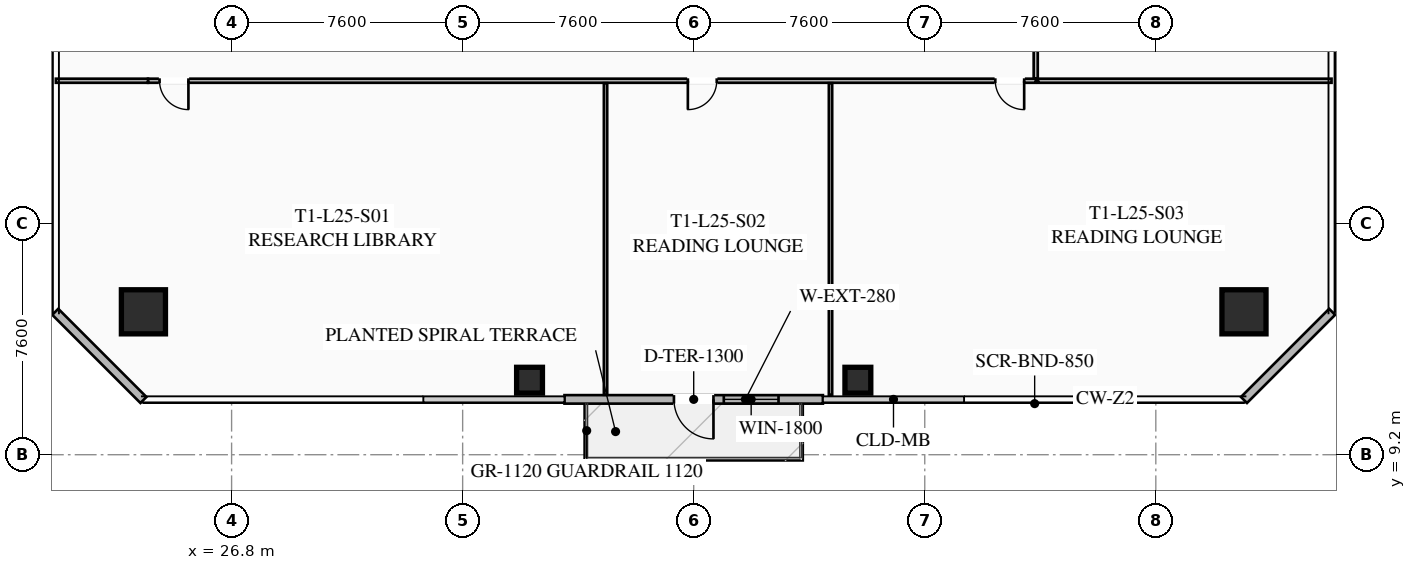
"""IFC4 building model, lengths in metres.
Left out: names, types, materials, properties, quantities, classifications, styles, units other than length and angle.
Written with IfcOpenShell. Run it as: python <this file> out.ifc"""

import sys

from ifc_helpers import new_model, si_unit, direction, frame, frame_2d, origin, origin_2d, place, context, subcontext, project, spatial, rectangle, hollow_rectangle, extrude, element, fill, save


model = new_model("IFC4")
c1 = context("Model", 3, precision=1e-05, world=origin(), true_north=direction((0.0, 1.0)))
c2 = subcontext(c1, "Body", "Model", "MODEL_VIEW")
j1 = project(units=[si_unit("LENGTHUNIT", "METRE"), si_unit("PLANEANGLEUNIT", "RADIAN")], contexts=[c1])
p1 = place(None, origin())
s1 = spatial("IfcSite", under=j1, at=p1, CompositionType="ELEMENT")
p2 = place(p1, origin())
s2 = spatial("IfcBuilding", under=s1, at=p2, CompositionType="ELEMENT")
p3 = place(p2, frame((0.0, 0.0, 95.6)))
s3 = spatial("IfcBuildingStorey", under=s2, at=p3, CompositionType="ELEMENT", Elevation=95.6)
for number, where, z_axis, x_axis in (
    (1, (23.9, 13.9, 0.0), (0.0, 0.0, 1.0), (1.0, 0.0, 0.0)),
    (2, (60.1, 13.9, 0.0), (0.0, 0.0, 1.0), (1.0, 0.0, 0.0)),
):
    element("IfcColumn", number, at=place(p3, frame(where, z_axis=z_axis, x_axis=x_axis)), inside=s3, PredefinedType="COLUMN", context=c2, shape_type="SweptSolid", body=[
        extrude(hollow_rectangle(XDim=1.45, YDim=1.45, WallThickness=0.055, at=origin_2d()), origin(), (0.0, 0.0, 1.0), 3.35),
    ])
for number, where, z_axis, x_axis in (
    (3, (36.6, 11.65, 0.0), (0.0, 0.0, 1.0), (1.0, 0.0, 0.0)),
    (4, (47.4, 11.65, 0.0), (0.0, 0.0, 1.0), (1.0, 0.0, 0.0)),
):
    element("IfcColumn", number, at=place(p3, frame(where, z_axis=z_axis, x_axis=x_axis)), inside=s3, PredefinedType="COLUMN", context=c2, shape_type="SweptSolid", body=[
        extrude(hollow_rectangle(XDim=0.85, YDim=0.85, WallThickness=0.035, at=origin_2d()), origin(), (0.0, 0.0, 1.0), 3.35),
    ])
p4 = place(p3, frame((46.25, 11.02, 0.0), z_axis=(0.0, 0.0, 1.0), x_axis=(-1.0, 0.0, 0.0)))
e5 = element("IfcWall", 5, at=p4, inside=s3, PredefinedType="SOLIDWALL", context=c2, shape_type="SweptSolid", body=[
    extrude(rectangle(XDim=8.5, YDim=0.28, at=frame_2d((4.25, 0.0))), origin(), (0.0, 0.0, 1.0), 3.35),
])
p5 = place(p4, frame((3.6, 0.0, 0.0)))
e6 = element("IfcOpeningElement", 6, at=p5, cuts=e5, PredefinedType="OPENING", context=c2, shape_type="SweptSolid", body=[
    extrude(rectangle(XDim=1.3, YDim=2.15, at=frame_2d((0.65, 1.075))), frame((0.0, 0.15, 0.0), z_axis=(0.0, -1.0, 0.0), x_axis=(1.0, 0.0, 0.0)), (0.0, 0.0, 1.0), 0.3),
])
p6 = place(p4, frame((1.46, 0.0, 0.85)))
e7 = element("IfcOpeningElement", 7, at=p6, cuts=e5, PredefinedType="OPENING", context=c2, shape_type="SweptSolid", body=[
    extrude(rectangle(XDim=1.8, YDim=1.92, at=frame_2d((0.9, 0.96))), frame((0.0, 0.15, 0.0), z_axis=(0.0, -1.0, 0.0), x_axis=(1.0, 0.0, 0.0)), (0.0, 0.0, 1.0), 0.3),
])
for number, where, z_axis, x_axis in (
    (8, (23.9, 11.0, 0.0), (0.0, 0.0, 1.0), (-0.707, 0.707, 0.0)),
    (9, (63.0, 13.9, 0.0), (0.0, 0.0, 1.0), (-0.707, -0.707, 0.0)),
):
    element("IfcWall", number, at=place(p3, frame(where, z_axis=z_axis, x_axis=x_axis)), inside=s3, PredefinedType="SOLIDWALL", context=c2, shape_type="SweptSolid", body=[
        extrude(rectangle(XDim=4.101, YDim=0.28, at=frame_2d((2.051, 0.0))), origin(), (0.0, 0.0, 1.0), 3.35),
    ])
p7 = place(p3, frame((53.25, 21.5, 0.0), z_axis=(0.0, 0.0, 1.0), x_axis=(-1.0, 0.0, 0.0)))
e10 = element("IfcWall", 10, at=p7, inside=s3, PredefinedType="PARTITIONING", context=c2, shape_type="SweptSolid", body=[
    extrude(rectangle(XDim=29.2, YDim=0.135, at=frame_2d((14.6, 0.0))), origin(), (0.0, 0.0, 1.0), 2.703),
])
p8 = place(p7, frame((27.87, 0.0, 0.0)))
e11 = element("IfcOpeningElement", 11, at=p8, cuts=e10, PredefinedType="OPENING", context=c2, shape_type="SweptSolid", body=[
    extrude(rectangle(XDim=0.95, YDim=2.05, at=frame_2d((0.475, 1.025))), frame((0.0, 0.077, 0.0), z_axis=(0.0, -1.0, 0.0), x_axis=(1.0, 0.0, 0.0)), (0.0, 0.0, 1.0), 0.155),
])
p9 = place(p7, frame((10.492, 0.0, 0.0)))
e12 = element("IfcOpeningElement", 12, at=p9, cuts=e10, PredefinedType="OPENING", context=c2, shape_type="SweptSolid", body=[
    extrude(rectangle(XDim=0.95, YDim=2.05, at=frame_2d((0.475, 1.025))), frame((0.0, 0.077, 0.0), z_axis=(0.0, -1.0, 0.0), x_axis=(1.0, 0.0, 0.0)), (0.0, 0.0, 1.0), 0.155),
])
p10 = place(p7, frame((0.38, 0.0, 0.0)))
e13 = element("IfcOpeningElement", 13, at=p10, cuts=e10, PredefinedType="OPENING", context=c2, shape_type="SweptSolid", body=[
    extrude(rectangle(XDim=0.95, YDim=2.05, at=frame_2d((0.475, 1.025))), frame((0.0, 0.077, 0.0), z_axis=(0.0, -1.0, 0.0), x_axis=(1.0, 0.0, 0.0)), (0.0, 0.0, 1.0), 0.155),
])
p11 = place(p3, frame((21.02, 21.5, 0.0), z_axis=(0.0, 0.0, 1.0), x_axis=(1.0, 0.0, 0.0)))
e14 = element("IfcWall", 14, at=p11, inside=s3, PredefinedType="PARTITIONING", context=c2, shape_type="SweptSolid", body=[
    extrude(rectangle(XDim=3.03, YDim=0.135, at=frame_2d((1.515, 0.0))), origin(), (0.0, 0.0, 1.0), 2.703),
])
for number, where, z_axis, x_axis in (
    (15, (39.1, 11.17, 0.0), (0.0, 0.0, 1.0), (0.0, 1.0, 0.0)),
    (16, (46.5, 11.17, 0.0), (0.0, 0.0, 1.0), (0.0, 1.0, 0.0)),
):
    element("IfcWall", number, at=place(p3, frame(where, z_axis=z_axis, x_axis=x_axis)), inside=s3, PredefinedType="PARTITIONING", context=c2, shape_type="SweptSolid", body=[
        extrude(rectangle(XDim=10.25, YDim=0.11, at=frame_2d((5.125, 0.0))), origin(), (0.0, 0.0, 1.0), 2.703),
    ])
p12 = place(p3, frame((53.25, 41.69, 0.0), z_axis=(0.0, 0.0, 1.0), x_axis=(0.0, -1.0, 0.0)))
e17 = element("IfcWall", 17, at=p12, inside=s3, PredefinedType="PARTITIONING", context=c2, shape_type="SweptSolid", body=[
    extrude(rectangle(XDim=20.11, YDim=0.135, at=frame_2d((10.055, 0.0))), origin(), (0.0, 0.0, 1.0), 2.703),
])
p13 = place(p12, frame((9.078, 0.0, 0.0)))
e18 = element("IfcOpeningElement", 18, at=p13, cuts=e17, PredefinedType="OPENING", context=c2, shape_type="SweptSolid", body=[
    extrude(rectangle(XDim=0.95, YDim=2.05, at=frame_2d((0.475, 1.025))), frame((0.0, 0.077, 0.0), z_axis=(0.0, -1.0, 0.0), x_axis=(1.0, 0.0, 0.0)), (0.0, 0.0, 1.0), 0.155),
])
p14 = place(p3, frame((53.33, 21.5, 0.0), z_axis=(0.0, 0.0, 1.0), x_axis=(1.0, 0.0, 0.0)))
e19 = element("IfcWall", 19, at=p14, inside=s3, PredefinedType="PARTITIONING", context=c2, shape_type="SweptSolid", body=[
    extrude(rectangle(XDim=9.65, YDim=0.135, at=frame_2d((4.825, 0.0))), origin(), (0.0, 0.0, 1.0), 2.703),
])
p15 = place(p5, origin())
e20 = element("IfcDoor", 20, at=p15, inside=s3, OperationType="SINGLE_SWING_LEFT", PredefinedType="DOOR", context=c2, shape_type="SweptSolid", body=[
    extrude(rectangle(XDim=1.3, YDim=2.15, at=frame_2d((0.65, 1.075))), frame((0.0, 0.025, 0.0), z_axis=(0.0, -1.0, 0.0), x_axis=(1.0, 0.0, 0.0)), (0.0, 0.0, 1.0), 0.05),
])
fill(e6, e20)
p16 = place(p6, origin())
e21 = element("IfcWindow", 21, at=p16, inside=s3, PartitioningType="SINGLE_PANEL", PredefinedType="WINDOW", context=c2, shape_type="SweptSolid", body=[
    extrude(rectangle(XDim=1.8, YDim=1.92, at=frame_2d((0.9, 0.96))), frame((0.0, 0.03, 0.0), z_axis=(0.0, -1.0, 0.0), x_axis=(1.0, 0.0, 0.0)), (0.0, 0.0, 1.0), 0.06),
])
fill(e7, e21)
p17 = place(p8, origin())
e22 = element("IfcDoor", 22, at=p17, inside=s3, OperationType="SINGLE_SWING_LEFT", PredefinedType="DOOR", context=c2, shape_type="SweptSolid", body=[
    extrude(rectangle(XDim=0.95, YDim=2.05, at=frame_2d((0.475, 1.025))), frame((0.0, 0.025, 0.0), z_axis=(0.0, -1.0, 0.0), x_axis=(1.0, 0.0, 0.0)), (0.0, 0.0, 1.0), 0.05),
])
fill(e11, e22)
p18 = place(p9, origin())
e23 = element("IfcDoor", 23, at=p18, inside=s3, OperationType="SINGLE_SWING_RIGHT", PredefinedType="DOOR", context=c2, shape_type="SweptSolid", body=[
    extrude(rectangle(XDim=0.95, YDim=2.05, at=frame_2d((0.475, 1.025))), frame((0.0, 0.025, 0.0), z_axis=(0.0, -1.0, 0.0), x_axis=(1.0, 0.0, 0.0)), (0.0, 0.0, 1.0), 0.05),
])
fill(e12, e23)
p19 = place(p10, origin())
e24 = element("IfcDoor", 24, at=p19, inside=s3, OperationType="SINGLE_SWING_LEFT", PredefinedType="DOOR", context=c2, shape_type="SweptSolid", body=[
    extrude(rectangle(XDim=0.95, YDim=2.05, at=frame_2d((0.475, 1.025))), frame((0.0, 0.025, 0.0), z_axis=(0.0, -1.0, 0.0), x_axis=(1.0, 0.0, 0.0)), (0.0, 0.0, 1.0), 0.05),
])
fill(e13, e24)
save(model, sys.argv[1])
